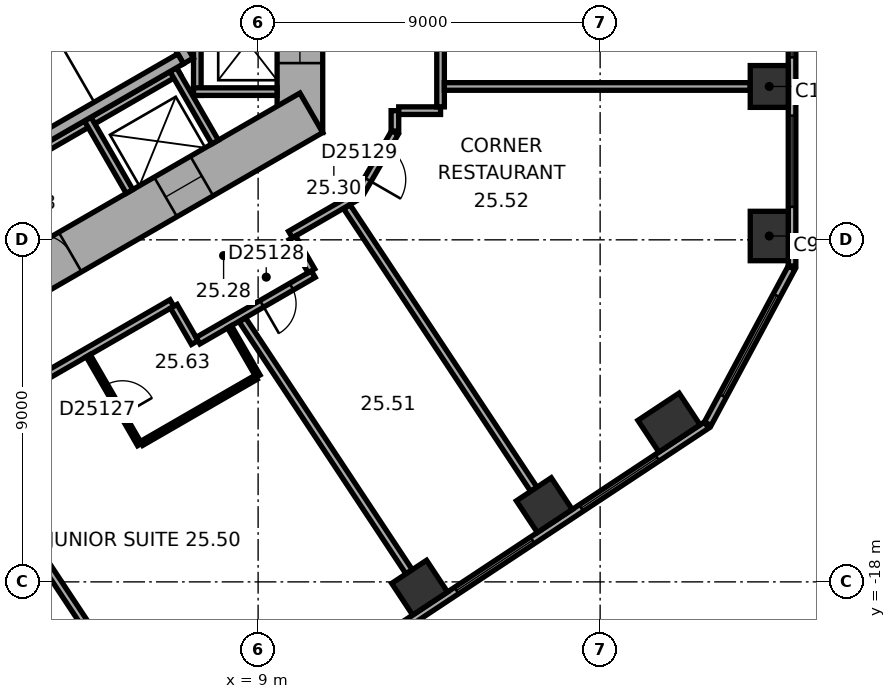
"""IFC4 building model, lengths in metres.
Left out: names, types, materials, properties, quantities, classifications, styles, units other than length and angle.
Written with IfcOpenShell. Run it as: python <this file> out.ifc"""

import sys

from ifc_helpers import new_model, si_unit, direction, frame, frame_2d, origin, origin_2d, place, context, subcontext, project, spatial, rectangle, extrude, element, fill, save


model = new_model("IFC4")
c1 = context("Model", 3, precision=1e-05, world=origin(), true_north=direction((0.0, 1.0)))
c2 = subcontext(c1, "Body", "Model", "MODEL_VIEW")
j1 = project(units=[si_unit("LENGTHUNIT", "METRE"), si_unit("PLANEANGLEUNIT", "RADIAN")], contexts=[c1])
p1 = place(None, origin())
s1 = spatial("IfcSite", under=j1, at=p1, CompositionType="ELEMENT")
p2 = place(p1, origin())
s2 = spatial("IfcBuilding", under=s1, at=p2, CompositionType="ELEMENT")
p3 = place(p2, frame((0.0, 0.0, 106.7)))
s3 = spatial("IfcBuildingStorey", under=s2, at=p3, CompositionType="ELEMENT", Elevation=106.7)
p4 = place(p3, frame((22.45, -8.899, 0.0), z_axis=(0.0, 0.0, 1.0), x_axis=(0.0, 1.0, 0.0)))
e1 = element("IfcColumn", 1, at=p4, inside=s3, PredefinedType="COLUMN", context=c2, shape_type="SweptSolid", body=[
    extrude(rectangle(XDim=1.3, YDim=1.0, at=origin_2d()), origin(), (0.0, 0.0, 1.0), 3.3),
])
for number, where, z_axis, x_axis in (
    (2, (22.45, -4.965, 0.0), (0.0, 0.0, 1.0), (0.0, 1.0, 0.0)),
    (3, (13.25, -18.152, 0.0), (0.0, 0.0, 1.0), (0.834, 0.552, 0.0)),
    (4, (16.531, -15.981, 0.0), (0.0, 0.0, 1.0), (0.834, 0.552, 0.0)),
):
    element("IfcColumn", number, at=place(p3, frame(where, z_axis=z_axis, x_axis=x_axis)), inside=s3, PredefinedType="COLUMN", context=c2, shape_type="SweptSolid", body=[
        extrude(rectangle(XDim=1.1, YDim=1.0, at=origin_2d()), origin(), (0.0, 0.0, 1.0), 3.3),
    ])
p5 = place(p3, frame((19.812, -13.809, 0.0), z_axis=(0.0, 0.0, 1.0), x_axis=(0.833885822067, 0.551936985312, 0.0)))
e5 = element("IfcColumn", 5, at=p5, inside=s3, PredefinedType="COLUMN", context=c2, shape_type="SweptSolid", body=[
    extrude(rectangle(XDim=1.3, YDim=1.0, at=origin_2d()), origin(), (0.0, 0.0, 1.0), 3.3),
])
p6 = place(p3, frame((10.1, -6.177, 0.0), z_axis=(0.0, 0.0, 1.0), x_axis=(0.0, 1.0, 0.0)))
e6 = element("IfcWall", 6, at=p6, inside=s3, PredefinedType="SHEAR", context=c2, shape_type="SweptSolid", body=[
    extrude(rectangle(XDim=12.355, YDim=1.2, at=frame_2d((6.177, 0.0))), origin(), (0.0, 0.0, 1.0), 3.3),
])
p7 = place(p6, frame((6.378, 0.0, 0.0)))
e7 = element("IfcOpeningElement", 7, at=p7, cuts=e6, PredefinedType="OPENING", context=c2, shape_type="SweptSolid", body=[
    extrude(rectangle(XDim=1.5, YDim=2.1, at=frame_2d((0.75, 1.05))), frame((0.0, 0.61, 0.0), z_axis=(0.0, -1.0, 0.0), x_axis=(1.0, 0.0, 0.0)), (0.0, 0.0, 1.0), 1.22),
])
p8 = place(p6, frame((1.828, 0.0, 0.0)))
e8 = element("IfcOpeningElement", 8, at=p8, cuts=e6, PredefinedType="OPENING", context=c2, shape_type="SweptSolid", body=[
    extrude(rectangle(XDim=1.1, YDim=2.1, at=frame_2d((0.55, 1.05))), frame((0.0, 0.61, 0.0), z_axis=(0.0, -1.0, 0.0), x_axis=(1.0, 0.0, 0.0)), (0.0, 0.0, 1.0), 1.22),
])
p9 = place(p6, frame((4.427, 0.0, 0.0)))
e9 = element("IfcOpeningElement", 9, at=p9, cuts=e6, PredefinedType="OPENING", context=c2, shape_type="SweptSolid", body=[
    extrude(rectangle(XDim=1.1, YDim=2.1, at=frame_2d((0.55, 1.05))), frame((0.0, 0.61, 0.0), z_axis=(0.0, -1.0, 0.0), x_axis=(1.0, 0.0, 0.0)), (0.0, 0.0, 1.0), 1.22),
])
p10 = place(p3, frame((-0.3, -11.836, 0.0), z_axis=(0.0, 0.0, 1.0), x_axis=(0.866021384402, 0.500006961711, 0.0)))
e10 = element("IfcWall", 10, at=p10, inside=s3, PredefinedType="SHEAR", context=c2, shape_type="SweptSolid", body=[
    extrude(rectangle(XDim=12.355, YDim=1.2, at=frame_2d((6.178, 0.0))), origin(), (0.0, 0.0, 1.0), 3.3),
])
p11 = place(p10, frame((4.128, 0.0, 0.0)))
e11 = element("IfcOpeningElement", 11, at=p11, cuts=e10, PredefinedType="OPENING", context=c2, shape_type="SweptSolid", body=[
    extrude(rectangle(XDim=0.9, YDim=2.1, at=frame_2d((0.45, 1.05))), frame((0.0, 0.61, 0.0), z_axis=(0.0, -1.0, 0.0), x_axis=(1.0, 0.0, 0.0)), (0.0, 0.0, 1.0), 1.22),
])
p12 = place(p10, frame((7.928, 0.0, 0.0)))
e12 = element("IfcOpeningElement", 12, at=p12, cuts=e10, PredefinedType="OPENING", context=c2, shape_type="SweptSolid", body=[
    extrude(rectangle(XDim=1.1, YDim=2.1, at=frame_2d((0.55, 1.05))), frame((0.0, 0.61, 0.0), z_axis=(0.0, -1.0, 0.0), x_axis=(1.0, 0.0, 0.0)), (0.0, 0.0, 1.0), 1.22),
])
p13 = place(p3, frame((23.05, -9.687, 0.0), z_axis=(0.0, 0.0, 1.0), x_axis=(0.0, 1.0, 0.0)))
e13 = element("IfcWall", 13, at=p13, inside=s3, PredefinedType="STANDARD", context=c2, shape_type="SweptSolid", body=[
    extrude(rectangle(XDim=21.246, YDim=0.2, at=frame_2d((10.623, 0.0))), origin(), (0.0, 0.0, 1.0), 3.3),
])
p14 = place(p13, frame((1.555, 0.0, 0.8)))
e14 = element("IfcOpeningElement", 14, at=p14, cuts=e13, PredefinedType="OPENING", context=c2, shape_type="SweptSolid", body=[
    extrude(rectangle(XDim=2.4, YDim=1.7, at=frame_2d((1.2, 0.85))), frame((0.0, 0.11, 0.0), z_axis=(0.0, -1.0, 0.0), x_axis=(1.0, 0.0, 0.0)), (0.0, 0.0, 1.0), 0.22),
])
p15 = place(p13, frame((5.489, 0.0, 0.8)))
e15 = element("IfcOpeningElement", 15, at=p15, cuts=e13, PredefinedType="OPENING", context=c2, shape_type="SweptSolid", body=[
    extrude(rectangle(XDim=2.4, YDim=1.7, at=frame_2d((1.2, 0.85))), frame((0.0, 0.11, 0.0), z_axis=(0.0, -1.0, 0.0), x_axis=(1.0, 0.0, 0.0)), (0.0, 0.0, 1.0), 0.22),
])
p16 = place(p13, frame((9.424, 0.0, 0.8)))
e16 = element("IfcOpeningElement", 16, at=p16, cuts=e13, PredefinedType="OPENING", context=c2, shape_type="SweptSolid", body=[
    extrude(rectangle(XDim=2.4, YDim=1.7, at=frame_2d((1.2, 0.85))), frame((0.0, 0.11, 0.0), z_axis=(0.0, -1.0, 0.0), x_axis=(1.0, 0.0, 0.0)), (0.0, 0.0, 1.0), 0.22),
])
p17 = place(p13, frame((13.358, 0.0, 0.8)))
e17 = element("IfcOpeningElement", 17, at=p17, cuts=e13, PredefinedType="OPENING", context=c2, shape_type="SweptSolid", body=[
    extrude(rectangle(XDim=2.4, YDim=1.7, at=frame_2d((1.2, 0.85))), frame((0.0, 0.11, 0.0), z_axis=(0.0, -1.0, 0.0), x_axis=(1.0, 0.0, 0.0)), (0.0, 0.0, 1.0), 0.22),
])
p18 = place(p13, frame((17.293, 0.0, 0.8)))
e18 = element("IfcOpeningElement", 18, at=p18, cuts=e13, PredefinedType="OPENING", context=c2, shape_type="SweptSolid", body=[
    extrude(rectangle(XDim=2.4, YDim=1.7, at=frame_2d((1.2, 0.85))), frame((0.0, 0.11, 0.0), z_axis=(0.0, -1.0, 0.0), x_axis=(1.0, 0.0, 0.0)), (0.0, 0.0, 1.0), 0.22),
])
p19 = place(p3, frame((3.083, -25.601, 0.0), z_axis=(0.0, 0.0, 1.0), x_axis=(0.833884295743, 0.551939291329, 0.0)))
e19 = element("IfcWall", 19, at=p19, inside=s3, PredefinedType="STANDARD", context=c2, shape_type="SweptSolid", body=[
    extrude(rectangle(XDim=21.246, YDim=0.2, at=frame_2d((10.623, 0.0))), origin(), (0.0, 0.0, 1.0), 3.3),
])
p20 = place(p19, frame((1.553, 0.0, 0.8)))
e20 = element("IfcOpeningElement", 20, at=p20, cuts=e19, PredefinedType="OPENING", context=c2, shape_type="SweptSolid", body=[
    extrude(rectangle(XDim=2.4, YDim=1.7, at=frame_2d((1.2, 0.85))), frame((0.0, 0.11, 0.0), z_axis=(0.0, -1.0, 0.0), x_axis=(1.0, 0.0, 0.0)), (0.0, 0.0, 1.0), 0.22),
])
p21 = place(p19, frame((5.488, 0.0, 0.8)))
e21 = element("IfcOpeningElement", 21, at=p21, cuts=e19, PredefinedType="OPENING", context=c2, shape_type="SweptSolid", body=[
    extrude(rectangle(XDim=2.4, YDim=1.7, at=frame_2d((1.2, 0.85))), frame((0.0, 0.11, 0.0), z_axis=(0.0, -1.0, 0.0), x_axis=(1.0, 0.0, 0.0)), (0.0, 0.0, 1.0), 0.22),
])
p22 = place(p19, frame((9.422, 0.0, 0.8)))
e22 = element("IfcOpeningElement", 22, at=p22, cuts=e19, PredefinedType="OPENING", context=c2, shape_type="SweptSolid", body=[
    extrude(rectangle(XDim=2.4, YDim=1.7, at=frame_2d((1.2, 0.85))), frame((0.0, 0.11, 0.0), z_axis=(0.0, -1.0, 0.0), x_axis=(1.0, 0.0, 0.0)), (0.0, 0.0, 1.0), 0.22),
])
p23 = place(p19, frame((13.357, 0.0, 0.8)))
e23 = element("IfcOpeningElement", 23, at=p23, cuts=e19, PredefinedType="OPENING", context=c2, shape_type="SweptSolid", body=[
    extrude(rectangle(XDim=2.4, YDim=1.7, at=frame_2d((1.2, 0.85))), frame((0.0, 0.11, 0.0), z_axis=(0.0, -1.0, 0.0), x_axis=(1.0, 0.0, 0.0)), (0.0, 0.0, 1.0), 0.22),
])
p24 = place(p19, frame((17.291, 0.0, 0.8)))
e24 = element("IfcOpeningElement", 24, at=p24, cuts=e19, PredefinedType="OPENING", context=c2, shape_type="SweptSolid", body=[
    extrude(rectangle(XDim=2.4, YDim=1.7, at=frame_2d((1.2, 0.85))), frame((0.0, 0.11, 0.0), z_axis=(0.0, -1.0, 0.0), x_axis=(1.0, 0.0, 0.0)), (0.0, 0.0, 1.0), 0.22),
])
p25 = place(p3, frame((20.833, -13.839, 0.0), z_axis=(0.0, 0.0, 1.0), x_axis=(0.473321668581, 0.880889662813, 0.0)))
e25 = element("IfcWall", 25, at=p25, inside=s3, PredefinedType="STANDARD", context=c2, shape_type="SweptSolid", body=[
    extrude(rectangle(XDim=4.66, YDim=0.2, at=frame_2d((2.33, 0.0))), origin(), (0.0, 0.0, 1.0), 3.3),
])
p26 = place(p25, frame((0.83, 0.0, 0.8)))
e26 = element("IfcOpeningElement", 26, at=p26, cuts=e25, PredefinedType="OPENING", context=c2, shape_type="SweptSolid", body=[
    extrude(rectangle(XDim=3.0, YDim=1.7, at=frame_2d((1.5, 0.85))), frame((0.0, 0.11, 0.0), z_axis=(0.0, -1.0, 0.0), x_axis=(1.0, 0.0, 0.0)), (0.0, 0.0, 1.0), 0.22),
])
p27 = place(p3, frame((7.4, -5.2, 0.0), z_axis=(0.0, 0.0, 1.0), x_axis=(0.0, 1.0, 0.0)))
e27 = element("IfcWall", 27, at=p27, inside=s3, PredefinedType="PARTITIONING", context=c2, shape_type="SweptSolid", body=[
    extrude(rectangle(XDim=5.4, YDim=0.2, at=frame_2d((2.7, 0.0))), origin(), (0.0, 0.0, 1.0), 3.05),
])
p28 = place(p3, frame((7.3, -5.1, 0.0), z_axis=(0.0, 0.0, 1.0), x_axis=(1.0, 0.0, 0.0)))
e28 = element("IfcWall", 28, at=p28, inside=s3, PredefinedType="PARTITIONING", context=c2, shape_type="SweptSolid", body=[
    extrude(rectangle(XDim=2.2, YDim=0.2, at=frame_2d((1.1, 0.0))), origin(), (0.0, 0.0, 1.0), 3.05),
])
p29 = place(p3, frame((-0.024, -8.559, 0.0), z_axis=(0.0, 0.0, 1.0), x_axis=(0.866026010844, 0.49999894854, 0.0)))
e29 = element("IfcWall", 29, at=p29, inside=s3, PredefinedType="PARTITIONING", context=c2, shape_type="SweptSolid", body=[
    extrude(rectangle(XDim=8.0, YDim=0.2, at=frame_2d((4.0, 0.0))), origin(), (0.0, 0.0, 1.0), 3.05),
])
for number, where, z_axis, x_axis in (
    (30, (4.516, -5.822, 0.0), (0.0, 0.0, 1.0), (0.5, -0.866, 0.0)),
    (31, (6.768, -4.522, 0.0), (0.0, 0.0, 1.0), (0.5, -0.866, 0.0)),
):
    element("IfcWall", number, at=place(p3, frame(where, z_axis=z_axis, x_axis=x_axis)), inside=s3, PredefinedType="PARTITIONING", context=c2, shape_type="SweptSolid", body=[
        extrude(rectangle(XDim=2.2, YDim=0.2, at=frame_2d((1.1, 0.0))), origin(), (0.0, 0.0, 1.0), 3.05),
    ])
p30 = place(p3, frame((4.816, -0.222, 0.0), z_axis=(0.0, 0.0, 1.0), x_axis=(0.499977259774, -0.866038532462, 0.0)))
e32 = element("IfcWall", 32, at=p30, inside=s3, PredefinedType="SHEAR", context=c2, shape_type="SweptSolid", body=[
    extrude(rectangle(XDim=4.7, YDim=0.3, at=frame_2d((2.35, 0.0))), origin(), (0.0, 0.0, 1.0), 3.05),
])
for number, where, z_axis, x_axis in (
    (33, (-1.353, -3.957, 0.0), (0.0, 0.0, 1.0), (0.866, 0.5, 0.0)),
    (34, (0.847, -7.767, 0.0), (0.0, 0.0, 1.0), (0.866, 0.5, 0.0)),
):
    element("IfcWall", number, at=place(p3, frame(where, z_axis=z_axis, x_axis=x_axis)), inside=s3, PredefinedType="SHEAR", context=c2, shape_type="SweptSolid", body=[
        extrude(rectangle(XDim=7.06, YDim=0.3, at=frame_2d((3.53, 0.0))), origin(), (0.0, 0.0, 1.0), 3.05),
    ])
p31 = place(p3, frame((1.033, -13.953, 0.0), z_axis=(0.0, 0.0, 1.0), x_axis=(0.866017531406, 0.500013635111, 0.0)))
e35 = element("IfcWall", 35, at=p31, inside=s3, PredefinedType="PARTITIONING", context=c2, shape_type="SweptSolid", body=[
    extrude(rectangle(XDim=6.58, YDim=0.2, at=frame_2d((3.29, 0.0))), origin(), (0.0, 0.0, 1.0), 3.05),
])
p32 = place(p31, frame((1.515, 0.0, 0.0)))
e36 = element("IfcOpeningElement", 36, at=p32, cuts=e35, PredefinedType="OPENING", context=c2, shape_type="SweptSolid", body=[
    extrude(rectangle(XDim=0.9, YDim=2.1, at=frame_2d((0.45, 1.05))), frame((0.0, 0.11, 0.0), z_axis=(0.0, -1.0, 0.0), x_axis=(1.0, 0.0, 0.0)), (0.0, 0.0, 1.0), 0.22),
])
p33 = place(p3, frame((5.881, -14.387, 0.0), z_axis=(0.0, 0.0, 1.0), x_axis=(-0.500048589285, 0.86599734893, 0.0)))
e37 = element("IfcWall", 37, at=p33, inside=s3, PredefinedType="PARTITIONING", context=c2, shape_type="SweptSolid", body=[
    extrude(rectangle(XDim=2.7, YDim=0.12, at=frame_2d((1.35, 0.0))), origin(), (0.0, 0.0, 1.0), 3.05),
])
p34 = place(p33, frame((0.9, 0.0, 0.0)))
e38 = element("IfcOpeningElement", 38, at=p34, cuts=e37, PredefinedType="OPENING", context=c2, shape_type="SweptSolid", body=[
    extrude(rectangle(XDim=0.9, YDim=2.1, at=frame_2d((0.45, 1.05))), frame((0.0, 0.07, 0.0), z_axis=(0.0, -1.0, 0.0), x_axis=(1.0, 0.0, 0.0)), (0.0, 0.0, 1.0), 0.14),
])
p35 = place(p3, frame((6.412, -22.079, 0.0), z_axis=(0.0, 0.0, 1.0), x_axis=(-0.551919507115, 0.83389739037, 0.0)))
e39 = element("IfcWall", 39, at=p35, inside=s3, PredefinedType="PARTITIONING", context=c2, shape_type="SweptSolid", body=[
    extrude(rectangle(XDim=9.635, YDim=0.2, at=frame_2d((4.817, 0.0))), origin(), (0.0, 0.0, 1.0), 3.05),
])
p36 = place(p3, frame((6.782, -10.749, 0.0), z_axis=(0.0, 0.0, 1.0), x_axis=(0.500074377092, -0.865982457891, 0.0)))
e40 = element("IfcWall", 40, at=p36, inside=s3, PredefinedType="PARTITIONING", context=c2, shape_type="SweptSolid", body=[
    extrude(rectangle(XDim=1.101, YDim=0.2, at=frame_2d((0.55, 0.0))), origin(), (0.0, 0.0, 1.0), 3.05),
])
p37 = place(p3, frame((7.419, -11.653, 0.0), z_axis=(0.0, 0.0, 1.0), x_axis=(0.866038154057, 0.49997791523, 0.0)))
e41 = element("IfcWall", 41, at=p37, inside=s3, PredefinedType="PARTITIONING", context=c2, shape_type="SweptSolid", body=[
    extrude(rectangle(XDim=3.502, YDim=0.2, at=frame_2d((1.751, 0.0))), origin(), (0.0, 0.0, 1.0), 3.05),
])
p38 = place(p37, frame((1.94, 0.0, 0.0)))
e42 = element("IfcOpeningElement", 42, at=p38, cuts=e41, PredefinedType="OPENING", context=c2, shape_type="SweptSolid", body=[
    extrude(rectangle(XDim=0.9, YDim=2.1, at=frame_2d((0.45, 1.05))), frame((0.0, 0.11, 0.0), z_axis=(0.0, -1.0, 0.0), x_axis=(1.0, 0.0, 0.0)), (0.0, 0.0, 1.0), 0.22),
])
p39 = place(p3, frame((8.249, -11.289, 0.0), z_axis=(0.0, 0.0, 1.0), x_axis=(0.499957405522, -0.866049994321, 0.0)))
e43 = element("IfcWall", 43, at=p39, inside=s3, PredefinedType="PARTITIONING", context=c2, shape_type="SweptSolid", body=[
    extrude(rectangle(XDim=1.499, YDim=0.12, at=frame_2d((0.75, 0.0))), origin(), (0.0, 0.0, 1.0), 3.05),
])
p40 = place(p3, frame((8.946, -12.617, 0.0), z_axis=(0.0, 0.0, 1.0), x_axis=(-0.865989304205, -0.500062521093, 0.0)))
e44 = element("IfcWall", 44, at=p40, inside=s3, PredefinedType="PARTITIONING", context=c2, shape_type="SweptSolid", body=[
    extrude(rectangle(XDim=3.48, YDim=0.12, at=frame_2d((1.74, 0.0))), origin(), (0.0, 0.0, 1.0), 3.05),
])
p41 = place(p3, frame((9.852, -8.861, 0.0), z_axis=(0.0, 0.0, 1.0), x_axis=(0.866013291437, 0.500020978615, 0.0)))
e45 = element("IfcWall", 45, at=p41, inside=s3, PredefinedType="PARTITIONING", context=c2, shape_type="SweptSolid", body=[
    extrude(rectangle(XDim=2.077, YDim=0.2, at=frame_2d((1.038, 0.0))), origin(), (0.0, 0.0, 1.0), 3.05),
])
p42 = place(p3, frame((10.402, -9.815, 0.0), z_axis=(0.0, 0.0, 1.0), x_axis=(-0.499968756647, 0.866043441391, 0.0)))
e46 = element("IfcWall", 46, at=p42, inside=s3, PredefinedType="PARTITIONING", context=c2, shape_type="SweptSolid", body=[
    extrude(rectangle(XDim=1.001, YDim=0.2, at=frame_2d((0.5, 0.0))), origin(), (0.0, 0.0, 1.0), 3.05),
])
p43 = place(p3, frame((11.67, -7.788, 0.0), z_axis=(0.0, 0.0, 1.0), x_axis=(0.500063286585, 0.865988862174, 0.0)))
e47 = element("IfcWall", 47, at=p43, inside=s3, PredefinedType="PARTITIONING", context=c2, shape_type="SweptSolid", body=[
    extrude(rectangle(XDim=1.86, YDim=0.2, at=frame_2d((0.93, 0.0))), origin(), (0.0, 0.0, 1.0), 3.05),
])
p44 = place(p43, frame((0.43, 0.0, 0.0)))
e48 = element("IfcOpeningElement", 48, at=p44, cuts=e47, PredefinedType="OPENING", context=c2, shape_type="SweptSolid", body=[
    extrude(rectangle(XDim=1.0, YDim=2.1, at=frame_2d((0.5, 1.05))), frame((0.0, 0.11, 0.0), z_axis=(0.0, -1.0, 0.0), x_axis=(1.0, 0.0, 0.0)), (0.0, 0.0, 1.0), 0.22),
])
p45 = place(p3, frame((12.6, -6.138, 0.0), z_axis=(0.0, 0.0, 1.0), x_axis=(0.0, 1.0, 0.0)))
e49 = element("IfcWall", 49, at=p45, inside=s3, PredefinedType="PARTITIONING", context=c2, shape_type="SweptSolid", body=[
    extrude(rectangle(XDim=0.537, YDim=0.2, at=frame_2d((0.268, 0.0))), origin(), (0.0, 0.0, 1.0), 3.05),
])
p46 = place(p3, frame((12.7, -5.601, 0.0), z_axis=(0.0, 0.0, 1.0), x_axis=(1.0, 0.0, 0.0)))
e50 = element("IfcWall", 50, at=p46, inside=s3, PredefinedType="PARTITIONING", context=c2, shape_type="SweptSolid", body=[
    extrude(rectangle(XDim=1.101, YDim=0.2, at=frame_2d((0.551, 0.0))), origin(), (0.0, 0.0, 1.0), 3.05),
])
p47 = place(p3, frame((12.974, -17.735, 0.0), z_axis=(0.0, 0.0, 1.0), x_axis=(-0.55192625685, 0.833892922982, 0.0)))
e51 = element("IfcWall", 51, at=p47, inside=s3, PredefinedType="PARTITIONING", context=c2, shape_type="SweptSolid", body=[
    extrude(rectangle(XDim=7.95, YDim=0.2, at=frame_2d((3.975, 0.0))), origin(), (0.0, 0.0, 1.0), 3.05),
])
p48 = place(p3, frame((13.801, -5.501, 0.0), z_axis=(0.0, 0.0, 1.0), x_axis=(0.0, 1.0, 0.0)))
e52 = element("IfcWall", 52, at=p48, inside=s3, PredefinedType="PARTITIONING", context=c2, shape_type="SweptSolid", body=[
    extrude(rectangle(XDim=5.702, YDim=0.2, at=frame_2d((2.851, 0.0))), origin(), (0.0, 0.0, 1.0), 3.05),
])
p49 = place(p48, frame((2.619, 0.0, 0.0)))
e53 = element("IfcOpeningElement", 53, at=p49, cuts=e52, PredefinedType="OPENING", context=c2, shape_type="SweptSolid", body=[
    extrude(rectangle(XDim=1.0, YDim=2.1, at=frame_2d((0.5, 1.05))), frame((0.0, 0.11, 0.0), z_axis=(0.0, -1.0, 0.0), x_axis=(1.0, 0.0, 0.0)), (0.0, 0.0, 1.0), 0.22),
])
p50 = place(p3, frame((13.901, -4.965, 0.0), z_axis=(0.0, 0.0, 1.0), x_axis=(1.0, 0.0, 0.0)))
e54 = element("IfcWall", 54, at=p50, inside=s3, PredefinedType="PARTITIONING", context=c2, shape_type="SweptSolid", body=[
    extrude(rectangle(XDim=8.049, YDim=0.2, at=frame_2d((4.024, 0.0))), origin(), (0.0, 0.0, 1.0), 3.05),
])
p51 = place(p3, frame((16.255, -15.564, 0.0), z_axis=(0.0, 0.0, 1.0), x_axis=(-0.55192208744, 0.833895682562, 0.0)))
e55 = element("IfcWall", 55, at=p51, inside=s3, PredefinedType="PARTITIONING", context=c2, shape_type="SweptSolid", body=[
    extrude(rectangle(XDim=8.913, YDim=0.2, at=frame_2d((4.457, 0.0))), origin(), (0.0, 0.0, 1.0), 2.6),
])
p52 = place(p14, origin())
e56 = element("IfcWindow", 56, at=p52, inside=s3, PartitioningType="SINGLE_PANEL", PredefinedType="WINDOW", context=c2, shape_type="SweptSolid", body=[
    extrude(rectangle(XDim=2.4, YDim=1.7, at=frame_2d((1.2, 0.85))), frame((0.0, 0.03, 0.0), z_axis=(0.0, -1.0, 0.0), x_axis=(1.0, 0.0, 0.0)), (0.0, 0.0, 1.0), 0.06),
])
fill(e14, e56)
p53 = place(p15, origin())
e57 = element("IfcWindow", 57, at=p53, inside=s3, PartitioningType="SINGLE_PANEL", PredefinedType="WINDOW", context=c2, shape_type="SweptSolid", body=[
    extrude(rectangle(XDim=2.4, YDim=1.7, at=frame_2d((1.2, 0.85))), frame((0.0, 0.03, 0.0), z_axis=(0.0, -1.0, 0.0), x_axis=(1.0, 0.0, 0.0)), (0.0, 0.0, 1.0), 0.06),
])
fill(e15, e57)
p54 = place(p23, origin())
e58 = element("IfcWindow", 58, at=p54, inside=s3, PartitioningType="SINGLE_PANEL", PredefinedType="WINDOW", context=c2, shape_type="SweptSolid", body=[
    extrude(rectangle(XDim=2.4, YDim=1.7, at=frame_2d((1.2, 0.85))), frame((0.0, 0.03, 0.0), z_axis=(0.0, -1.0, 0.0), x_axis=(1.0, 0.0, 0.0)), (0.0, 0.0, 1.0), 0.06),
])
fill(e23, e58)
p55 = place(p24, origin())
e59 = element("IfcWindow", 59, at=p55, inside=s3, PartitioningType="SINGLE_PANEL", PredefinedType="WINDOW", context=c2, shape_type="SweptSolid", body=[
    extrude(rectangle(XDim=2.4, YDim=1.7, at=frame_2d((1.2, 0.85))), frame((0.0, 0.03, 0.0), z_axis=(0.0, -1.0, 0.0), x_axis=(1.0, 0.0, 0.0)), (0.0, 0.0, 1.0), 0.06),
])
fill(e24, e59)
p56 = place(p26, origin())
e60 = element("IfcWindow", 60, at=p56, inside=s3, PartitioningType="SINGLE_PANEL", PredefinedType="WINDOW", context=c2, shape_type="SweptSolid", body=[
    extrude(rectangle(XDim=3.0, YDim=1.7, at=frame_2d((1.5, 0.85))), frame((0.0, 0.03, 0.0), z_axis=(0.0, -1.0, 0.0), x_axis=(1.0, 0.0, 0.0)), (0.0, 0.0, 1.0), 0.06),
])
fill(e26, e60)
p57 = place(p11, origin())
e61 = element("IfcDoor", 61, at=p57, inside=s3, OperationType="SINGLE_SWING_LEFT", PredefinedType="DOOR", context=c2, shape_type="SweptSolid", body=[
    extrude(rectangle(XDim=0.9, YDim=2.1, at=frame_2d((0.45, 1.05))), frame((0.0, 0.025, 0.0), z_axis=(0.0, -1.0, 0.0), x_axis=(1.0, 0.0, 0.0)), (0.0, 0.0, 1.0), 0.05),
])
fill(e11, e61)
p58 = place(p8, origin())
e62 = element("IfcDoor", 62, at=p58, inside=s3, OperationType="DOUBLE_DOOR_SLIDING", PredefinedType="DOOR", context=c2, shape_type="SweptSolid", body=[
    extrude(rectangle(XDim=1.1, YDim=2.1, at=frame_2d((0.55, 1.05))), frame((0.0, 0.025, 0.0), z_axis=(0.0, -1.0, 0.0), x_axis=(1.0, 0.0, 0.0)), (0.0, 0.0, 1.0), 0.05),
])
fill(e8, e62)
p59 = place(p12, origin())
e63 = element("IfcDoor", 63, at=p59, inside=s3, OperationType="DOUBLE_DOOR_SLIDING", PredefinedType="DOOR", context=c2, shape_type="SweptSolid", body=[
    extrude(rectangle(XDim=1.1, YDim=2.1, at=frame_2d((0.55, 1.05))), frame((0.0, 0.025, 0.0), z_axis=(0.0, -1.0, 0.0), x_axis=(1.0, 0.0, 0.0)), (0.0, 0.0, 1.0), 0.05),
])
fill(e12, e63)
p60 = place(p34, origin())
e64 = element("IfcDoor", 64, at=p60, inside=s3, OperationType="SINGLE_SWING_LEFT", PredefinedType="DOOR", context=c2, shape_type="SweptSolid", body=[
    extrude(rectangle(XDim=0.9, YDim=2.1, at=frame_2d((0.45, 1.05))), frame((0.0, 0.025, 0.0), z_axis=(0.0, -1.0, 0.0), x_axis=(1.0, 0.0, 0.0)), (0.0, 0.0, 1.0), 0.05),
])
fill(e38, e64)
p61 = place(p38, origin())
e65 = element("IfcDoor", 65, at=p61, inside=s3, OperationType="SINGLE_SWING_LEFT", PredefinedType="DOOR", context=c2, shape_type="SweptSolid", body=[
    extrude(rectangle(XDim=0.9, YDim=2.1, at=frame_2d((0.45, 1.05))), frame((0.0, 0.025, 0.0), z_axis=(0.0, -1.0, 0.0), x_axis=(1.0, 0.0, 0.0)), (0.0, 0.0, 1.0), 0.05),
])
fill(e42, e65)
p62 = place(p44, origin())
e66 = element("IfcDoor", 66, at=p62, inside=s3, OperationType="SINGLE_SWING_LEFT", PredefinedType="DOOR", context=c2, shape_type="SweptSolid", body=[
    extrude(rectangle(XDim=1.0, YDim=2.1, at=frame_2d((0.5, 1.05))), frame((0.0, 0.025, 0.0), z_axis=(0.0, -1.0, 0.0), x_axis=(1.0, 0.0, 0.0)), (0.0, 0.0, 1.0), 0.05),
])
fill(e48, e66)
save(model, sys.argv[1])
